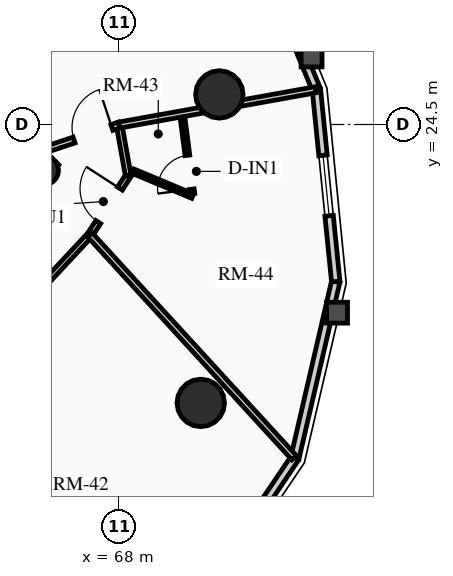
"""IFC4 building model, lengths in metres.
Left out: names, types, materials, properties, quantities, classifications, styles, units other than length and angle.
Written with IfcOpenShell. Run it as: python <this file> out.ifc"""

import sys

from ifc_helpers import new_model, si_unit, direction, frame, frame_2d, origin, origin_2d, place, context, subcontext, project, spatial, rectangle, circle, hollow_circle, extrude, source, transform, mapped, element, fill, save


model = new_model("IFC4")
c1 = context("Model", 3, precision=1e-05, world=origin(), true_north=direction((0.0, 1.0)))
c2 = subcontext(c1, "Body", "Model", "MODEL_VIEW")
j1 = project(units=[si_unit("LENGTHUNIT", "METRE"), si_unit("PLANEANGLEUNIT", "RADIAN")], contexts=[c1])
p1 = place(None, origin())
s1 = spatial("IfcSite", under=j1, at=p1, CompositionType="ELEMENT")
p2 = place(p1, origin())
s2 = spatial("IfcBuilding", under=s1, at=p2, CompositionType="ELEMENT")
p3 = place(p2, frame((0.0, 0.0, 157.42)))
s3 = spatial("IfcBuildingStorey", under=s2, at=p3, CompositionType="ELEMENT", Elevation=157.42)
p4 = place(p3, frame((66.268, 23.298, 0.0), z_axis=(0.0, 0.0, 1.0), x_axis=(-0.707106781187, 0.707106781187, 0.0)))
e1 = element("IfcWall", 1, at=p4, inside=s3, PredefinedType="SHEAR", context=c2, shape_type="SweptSolid", body=[
    extrude(rectangle(XDim=14.1, YDim=0.4, at=frame_2d((7.05, 0.0))), origin(), (0.0, 0.0, 1.0), 2.91),
])
p5 = place(p3, frame((58.561, 15.873, 0.0), z_axis=(0.0, 0.0, 1.0), x_axis=(0.707106781187, 0.707106781187, 0.0)))
e2 = element("IfcWall", 2, at=p5, inside=s3, PredefinedType="SHEAR", context=c2, shape_type="SweptSolid", body=[
    extrude(rectangle(XDim=10.7, YDim=0.4, at=frame_2d((5.35, 0.0))), origin(), (0.0, 0.0, 1.0), 2.91),
])
m1 = source(origin(), c2, "Body", "SweptSolid", [
    extrude(rectangle(XDim=1.5, YDim=2.02, at=frame_2d((0.75, 1.01))), frame((0.0, 0.21, 0.0), z_axis=(0.0, -1.0, 0.0), x_axis=(1.0, 0.0, 0.0)), (0.0, 0.0, 1.0), 0.42),
])
p6 = place(p5, frame((5.45, 0.0, 0.0)))
e3 = element("IfcOpeningElement", 3, at=p6, cuts=e2, PredefinedType="OPENING", context=c2, shape_type="MappedRepresentation", body=[
    mapped(m1, transform((0.0, 0.0, 0.0), x_axis=(1.0, 0.0, 0.0), y_axis=(0.0, 1.0, 0.0), z_axis=(0.0, 0.0, 1.0), scale=1.0)),
])
p7 = place(p3, frame((66.024, 23.294, 0.0), z_axis=(0.0, 0.0, 1.0), x_axis=(0.707106781187, 0.707106781187, 0.0)))
e4 = element("IfcColumn", 4, at=p7, inside=s3, PredefinedType="COLUMN", context=c2, shape_type="SweptSolid", body=[
    extrude(hollow_circle(Radius=0.38, WallThickness=0.032, at=origin_2d()), origin(), (0.0, 0.0, 1.0), 2.91),
])
for number, where, z_axis, x_axis in (
    (5, (70.146, 17.173, 0.0), (0.0, 0.0, 1.0), (1.0, 0.0, 0.0)),
    (6, (70.635, 25.291, 0.0), (0.0, 0.0, 1.0), (1.0, 0.0, 0.0)),
):
    element("IfcColumn", number, at=place(p3, frame(where, z_axis=z_axis, x_axis=x_axis)), inside=s3, PredefinedType="USERDEFINED", context=c2, shape_type="SweptSolid", body=[
        extrude(circle(Radius=0.625, at=origin_2d()), origin(), (0.0, 0.0, 1.0), 2.91),
    ])
p8 = place(p3, frame((72.622, 15.721, 0.0), z_axis=(0.0, 0.0, 1.0), x_axis=(-0.559635286042, -0.828739009952, 0.0)))
e7 = element("IfcWall", 7, at=p8, inside=s3, PredefinedType="SOLIDWALL", context=c2, shape_type="SweptSolid", body=[
    extrude(rectangle(XDim=4.569, YDim=0.22, at=frame_2d((2.284, 0.0))), origin(), (0.0, 0.0, 1.0), 2.245),
])
m2 = source(origin(), c2, "Body", "SweptSolid", [
    extrude(rectangle(XDim=1.6, YDim=1.3, at=frame_2d((0.8, 0.65))), frame((0.0, 0.12, 0.0), z_axis=(0.0, -1.0, 0.0), x_axis=(1.0, 0.0, 0.0)), (0.0, 0.0, 1.0), 0.24),
])
p9 = place(p8, frame((1.484, 0.0, 0.65)))
e8 = element("IfcOpeningElement", 8, at=p9, cuts=e7, PredefinedType="OPENING", context=c2, shape_type="MappedRepresentation", body=[
    mapped(m2, transform((0.0, 0.0, 0.0), x_axis=(1.0, 0.0, 0.0), y_axis=(0.0, 1.0, 0.0), z_axis=(0.0, 0.0, 1.0), scale=1.0)),
])
p10 = place(p3, frame((73.698, 20.367, 0.0), z_axis=(0.0, 0.0, 1.0), x_axis=(-0.225659540039, -0.974206226622, 0.0)))
e9 = element("IfcWall", 9, at=p10, inside=s3, PredefinedType="SOLIDWALL", context=c2, shape_type="SweptSolid", body=[
    extrude(rectangle(XDim=4.769, YDim=0.22, at=frame_2d((2.385, 0.0))), origin(), (0.0, 0.0, 1.0), 2.245),
])
p11 = place(p3, frame((73.189, 25.418, 0.0), z_axis=(0.0, 0.0, 1.0), x_axis=(0.100279889424, -0.994959267396, 0.0)))
e10 = element("IfcWall", 10, at=p11, inside=s3, PredefinedType="SOLIDWALL", context=c2, shape_type="SweptSolid", body=[
    extrude(rectangle(XDim=5.076, YDim=0.22, at=frame_2d((2.538, 0.0))), origin(), (0.0, 0.0, 1.0), 2.245),
])
p12 = place(p11, frame((1.738, 0.0, 0.65)))
e11 = element("IfcOpeningElement", 11, at=p12, cuts=e10, PredefinedType="OPENING", context=c2, shape_type="MappedRepresentation", body=[
    mapped(m2, transform((0.0, 0.0, 0.0), x_axis=(1.0, 0.0, 0.0), y_axis=(0.0, 1.0, 0.0), z_axis=(0.0, 0.0, 1.0), scale=1.0)),
])
p13 = place(p3, frame((71.144, 30.378, 0.0), z_axis=(0.0, 0.0, 1.0), x_axis=(0.38111364655, -0.924528197738, 0.0)))
e12 = element("IfcWall", 12, at=p13, inside=s3, PredefinedType="SOLIDWALL", context=c2, shape_type="SweptSolid", body=[
    extrude(rectangle(XDim=5.366, YDim=0.22, at=frame_2d((2.683, 0.0))), origin(), (0.0, 0.0, 1.0), 2.245),
])
p14 = place(p3, frame((62.784, 16.83, 0.0), z_axis=(0.0, 0.0, 1.0), x_axis=(0.682240832942, 0.731127516831, 0.0)))
e13 = element("IfcWall", 13, at=p14, inside=s3, PredefinedType="PARTITIONING", context=c2, shape_type="SweptSolid", body=[
    extrude(rectangle(XDim=6.517, YDim=0.15, at=frame_2d((3.259, 0.0))), origin(), (0.0, 0.0, 1.0), 2.245),
])
m3 = source(origin(), c2, "Body", "SweptSolid", [
    extrude(rectangle(XDim=1.05, YDim=2.015, at=frame_2d((0.525, 1.007))), frame((0.0, 0.085, 0.0), z_axis=(0.0, -1.0, 0.0), x_axis=(1.0, 0.0, 0.0)), (0.0, 0.0, 1.0), 0.17),
])
p15 = place(p14, frame((2.734, 0.0, 0.0)))
e14 = element("IfcOpeningElement", 14, at=p15, cuts=e13, PredefinedType="OPENING", context=c2, shape_type="MappedRepresentation", body=[
    mapped(m3, transform((0.0, 0.0, 0.0), x_axis=(1.0, 0.0, 0.0), y_axis=(0.0, 1.0, 0.0), z_axis=(0.0, 0.0, 1.0), scale=1.0)),
])
p16 = place(p3, frame((67.23, 21.595, 0.0), z_axis=(0.0, 0.0, 1.0), x_axis=(0.543687770222, 0.839287560084, 0.0)))
e15 = element("IfcWall", 15, at=p16, inside=s3, PredefinedType="PARTITIONING", context=c2, shape_type="SweptSolid", body=[
    extrude(rectangle(XDim=1.855, YDim=0.15, at=frame_2d((0.927, 0.0))), origin(), (0.0, 0.0, 1.0), 2.245),
])
p17 = place(p16, frame((0.402, 0.0, 0.0)))
e16 = element("IfcOpeningElement", 16, at=p17, cuts=e15, PredefinedType="OPENING", context=c2, shape_type="MappedRepresentation", body=[
    mapped(m3, transform((0.0, 0.0, 0.0), x_axis=(1.0, 0.0, 0.0), y_axis=(0.0, 1.0, 0.0), z_axis=(0.0, 0.0, 1.0), scale=1.0)),
])
p18 = place(p3, frame((68.239, 23.152, 0.0), z_axis=(0.0, 0.0, 1.0), x_axis=(-0.177076146115, 0.984197154272, 0.0)))
e17 = element("IfcWall", 17, at=p18, inside=s3, PredefinedType="PARTITIONING", context=c2, shape_type="SweptSolid", body=[
    extrude(rectangle(XDim=1.354, YDim=0.15, at=frame_2d((0.677, 0.0))), origin(), (0.0, 0.0, 1.0), 2.245),
])
p19 = place(p3, frame((67.23, 21.595, 0.0), z_axis=(0.0, 0.0, 1.0), x_axis=(0.67560509773, -0.737263692258, 0.0)))
e18 = element("IfcWall", 18, at=p19, inside=s3, PredefinedType="PARTITIONING", context=c2, shape_type="SweptSolid", body=[
    extrude(rectangle(XDim=7.955, YDim=0.16, at=frame_2d((3.978, 0.0))), origin(), (0.0, 0.0, 1.0), 2.245),
])
p20 = place(p3, frame((67.999, 24.485, 0.0), z_axis=(0.0, 0.0, 1.0), x_axis=(0.984209402602, 0.177008055834, 0.0)))
e19 = element("IfcWall", 19, at=p20, inside=s3, PredefinedType="PARTITIONING", context=c2, shape_type="SweptSolid", body=[
    extrude(rectangle(XDim=5.254, YDim=0.16, at=frame_2d((2.627, 0.0))), origin(), (0.0, 0.0, 1.0), 2.245),
])
p21 = place(p3, frame((66.021, 23.828, 0.0), z_axis=(0.0, 0.0, 1.0), x_axis=(0.949104122534, 0.314962481241, 0.0)))
e20 = element("IfcWall", 20, at=p21, inside=s3, PredefinedType="PARTITIONING", context=c2, shape_type="SweptSolid", body=[
    extrude(rectangle(XDim=2.084, YDim=0.16, at=frame_2d((1.042, 0.0))), origin(), (0.0, 0.0, 1.0), 2.245),
])
m4 = source(origin(), c2, "Body", "SweptSolid", [
    extrude(rectangle(XDim=1.05, YDim=2.015, at=frame_2d((0.525, 1.007))), frame((0.0, 0.09, 0.0), z_axis=(0.0, -1.0, 0.0), x_axis=(1.0, 0.0, 0.0)), (0.0, 0.0, 1.0), 0.18),
])
p22 = place(p21, frame((0.834, 0.0, 0.0)))
e21 = element("IfcOpeningElement", 21, at=p22, cuts=e20, PredefinedType="OPENING", context=c2, shape_type="MappedRepresentation", body=[
    mapped(m4, transform((0.0, 0.0, 0.0), x_axis=(1.0, 0.0, 0.0), y_axis=(0.0, 1.0, 0.0), z_axis=(0.0, 0.0, 1.0), scale=1.0)),
])
p23 = place(p3, frame((68.367, 23.271, 0.0), z_axis=(0.0, 0.0, 1.0), x_axis=(0.922420747941, -0.386186436541, 0.0)))
e22 = element("IfcWall", 22, at=p23, inside=s3, PredefinedType="PARTITIONING", context=c2, shape_type="SweptSolid", body=[
    extrude(rectangle(XDim=1.699, YDim=0.125, at=frame_2d((0.849, 0.0))), origin(), (0.0, 0.0, 1.0), 2.312),
])
p24 = place(p3, frame((69.926, 22.678, 0.0), z_axis=(0.0, 0.0, 1.0), x_axis=(-0.128245661315, 0.991742431458, 0.0)))
e23 = element("IfcWall", 23, at=p24, inside=s3, PredefinedType="PARTITIONING", context=c2, shape_type="SweptSolid", body=[
    extrude(rectangle(XDim=2.033, YDim=0.125, at=frame_2d((1.017, 0.0))), origin(), (0.0, 0.0, 1.0), 2.312),
])
m5 = source(origin(), c2, "Body", "SweptSolid", [
    extrude(rectangle(XDim=0.9, YDim=2.005, at=frame_2d((0.45, 1.002))), frame((0.0, 0.073, 0.0), z_axis=(0.0, -1.0, 0.0), x_axis=(1.0, 0.0, 0.0)), (0.0, 0.0, 1.0), 0.145),
])
p25 = place(p24, frame((0.12, 0.0, 0.0)))
e24 = element("IfcOpeningElement", 24, at=p25, cuts=e23, PredefinedType="OPENING", context=c2, shape_type="MappedRepresentation", body=[
    mapped(m5, transform((0.0, 0.0, 0.0), x_axis=(1.0, 0.0, 0.0), y_axis=(0.0, 1.0, 0.0), z_axis=(0.0, 0.0, 1.0), scale=1.0)),
])
m6 = source(origin(), c2, "Body", "SweptSolid", [
    extrude(rectangle(XDim=1.6, YDim=1.3, at=frame_2d((0.8, 0.65))), frame((0.0, 0.03, 0.0), z_axis=(0.0, -1.0, 0.0), x_axis=(1.0, 0.0, 0.0)), (0.0, 0.0, 1.0), 0.06),
])
p26 = place(p12, origin())
e25 = element("IfcWindow", 25, at=p26, inside=s3, PartitioningType="SINGLE_PANEL", PredefinedType="WINDOW", context=c2, shape_type="MappedRepresentation", body=[
    mapped(m6, transform((0.0, 0.0, 0.0), x_axis=(1.0, 0.0, 0.0), y_axis=(0.0, 1.0, 0.0), z_axis=(0.0, 0.0, 1.0), scale=1.0)),
])
fill(e11, e25)
m7 = source(origin(), c2, "Body", "SweptSolid", [
    extrude(rectangle(XDim=1.05, YDim=2.015, at=frame_2d((0.525, 1.007))), frame((0.0, 0.025, 0.0), z_axis=(0.0, -1.0, 0.0), x_axis=(1.0, 0.0, 0.0)), (0.0, 0.0, 1.0), 0.05),
])
p27 = place(p22, origin())
e26 = element("IfcDoor", 26, at=p27, inside=s3, OperationType="SINGLE_SWING_RIGHT", PredefinedType="DOOR", context=c2, shape_type="MappedRepresentation", body=[
    mapped(m7, transform((0.0, 0.0, 0.0), x_axis=(1.0, 0.0, 0.0), y_axis=(0.0, 1.0, 0.0), z_axis=(0.0, 0.0, 1.0), scale=1.0)),
])
fill(e21, e26)
p28 = place(p17, origin())
e27 = element("IfcDoor", 27, at=p28, inside=s3, OperationType="SINGLE_SWING_RIGHT", PredefinedType="DOOR", context=c2, shape_type="MappedRepresentation", body=[
    mapped(m7, transform((0.0, 0.0, 0.0), x_axis=(1.0, 0.0, 0.0), y_axis=(0.0, 1.0, 0.0), z_axis=(0.0, 0.0, 1.0), scale=1.0)),
])
fill(e16, e27)
m8 = source(origin(), c2, "Body", "SweptSolid", [
    extrude(rectangle(XDim=0.9, YDim=2.005, at=frame_2d((0.45, 1.002))), frame((0.0, 0.025, 0.0), z_axis=(0.0, -1.0, 0.0), x_axis=(1.0, 0.0, 0.0)), (0.0, 0.0, 1.0), 0.05),
])
p29 = place(p25, origin())
e28 = element("IfcDoor", 28, at=p29, inside=s3, OperationType="SINGLE_SWING_LEFT", PredefinedType="DOOR", context=c2, shape_type="MappedRepresentation", body=[
    mapped(m8, transform((0.0, 0.0, 0.0), x_axis=(1.0, 0.0, 0.0), y_axis=(0.0, 1.0, 0.0), z_axis=(0.0, 0.0, 1.0), scale=1.0)),
])
fill(e24, e28)
save(model, sys.argv[1])
